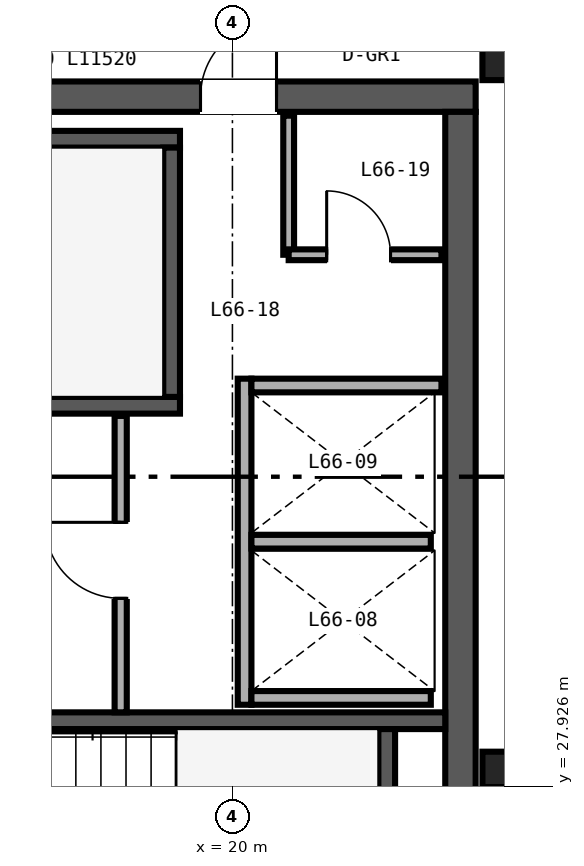
"""IFC4 building model, lengths in metres.
Left out: names, types, materials, properties, quantities, classifications, styles, units other than length and angle.
Written with IfcOpenShell. Run it as: python <this file> out.ifc"""

import sys

from ifc_helpers import new_model, si_unit, direction, frame, frame_2d, origin, origin_2d, place, context, subcontext, project, spatial, rectangle, i_section, extrude, source, transform, mapped, element, fill, save


model = new_model("IFC4")
c1 = context("Model", 3, precision=1e-05, world=origin(), true_north=direction((0.0, 1.0)))
c2 = subcontext(c1, "Body", "Model", "MODEL_VIEW")
j1 = project(units=[si_unit("LENGTHUNIT", "METRE"), si_unit("PLANEANGLEUNIT", "RADIAN")], contexts=[c1])
p1 = place(None, origin())
s1 = spatial("IfcSite", under=j1, at=p1, CompositionType="ELEMENT")
p2 = place(p1, origin())
s2 = spatial("IfcBuilding", under=s1, at=p2, CompositionType="ELEMENT")
p3 = place(p2, frame((0.0, 0.0, 261.6)))
s3 = spatial("IfcBuildingStorey", under=s2, at=p3, CompositionType="ELEMENT", Elevation=261.6)
p4 = place(p3, frame((10.8, 37.0, 0.0), z_axis=(0.0, 0.0, 1.0), x_axis=(1.0, 0.0, 0.0)))
e1 = element("IfcWall", 1, at=p4, inside=s3, PredefinedType="SHEAR", context=c2, shape_type="SweptSolid", body=[
    extrude(rectangle(XDim=12.4, YDim=0.4, at=frame_2d((6.2, 0.0))), origin(), (0.0, 0.0, 1.0), 3.38),
])
p5 = place(p4, frame((8.78, 0.0, 0.0)))
e2 = element("IfcOpeningElement", 2, at=p5, cuts=e1, PredefinedType="OPENING", context=c2, shape_type="SweptSolid", body=[
    extrude(rectangle(XDim=1.0, YDim=2.15, at=frame_2d((0.5, 1.075))), frame((0.0, 0.21, 0.0), z_axis=(0.0, -1.0, 0.0), x_axis=(1.0, 0.0, 0.0)), (0.0, 0.0, 1.0), 0.42),
])
p6 = place(p3, frame((23.0, 15.2, 0.0), z_axis=(0.0, 0.0, 1.0), x_axis=(0.0, 1.0, 0.0)))
e3 = element("IfcWall", 3, at=p6, inside=s3, PredefinedType="SHEAR", context=c2, shape_type="SweptSolid", body=[
    extrude(rectangle(XDim=21.6, YDim=0.4, at=frame_2d((10.8, 0.0))), origin(), (0.0, 0.0, 1.0), 3.38),
])
p7 = place(p3, frame((11.2, 32.94, 0.0), z_axis=(0.0, 0.0, 1.0), x_axis=(1.0, 0.0, 0.0)))
e4 = element("IfcWall", 4, at=p7, inside=s3, PredefinedType="SHEAR", context=c2, shape_type="SweptSolid", body=[
    extrude(rectangle(XDim=8.11, YDim=0.22, at=frame_2d((4.055, 0.0))), origin(), (0.0, 0.0, 1.0), 3.4),
])
p8 = place(p7, frame((0.72, 0.0, 0.0)))
e5 = element("IfcOpeningElement", 5, at=p8, cuts=e4, PredefinedType="OPENING", context=c2, shape_type="SweptSolid", body=[
    extrude(rectangle(XDim=1.05, YDim=2.15, at=frame_2d((0.525, 1.075))), frame((0.0, 0.12, 0.0), z_axis=(0.0, -1.0, 0.0), x_axis=(1.0, 0.0, 0.0)), (0.0, 0.0, 1.0), 0.24),
])
p9 = place(p3, frame((11.2, 36.44, 0.0), z_axis=(0.0, 0.0, 1.0), x_axis=(1.0, 0.0, 0.0)))
e6 = element("IfcWall", 6, at=p9, inside=s3, PredefinedType="SHEAR", context=c2, shape_type="SweptSolid", body=[
    extrude(rectangle(XDim=8.11, YDim=0.22, at=frame_2d((4.055, 0.0))), origin(), (0.0, 0.0, 1.0), 3.4),
])
p10 = place(p3, frame((19.2, 33.05, 0.0), z_axis=(0.0, 0.0, 1.0), x_axis=(0.0, 1.0, 0.0)))
e7 = element("IfcWall", 7, at=p10, inside=s3, PredefinedType="SHEAR", context=c2, shape_type="SweptSolid", body=[
    extrude(rectangle(XDim=3.28, YDim=0.22, at=frame_2d((1.64, 0.0))), origin(), (0.0, 0.0, 1.0), 3.4),
])
p11 = place(p3, frame((14.18, 28.79, 0.0), z_axis=(0.0, 0.0, 1.0), x_axis=(1.0, 0.0, 0.0)))
e8 = element("IfcWall", 8, at=p11, inside=s3, PredefinedType="SHEAR", context=c2, shape_type="SweptSolid", body=[
    extrude(rectangle(XDim=8.62, YDim=0.22, at=frame_2d((4.31, 0.0))), origin(), (0.0, 0.0, 1.0), 3.4),
])
p12 = place(p3, frame((22.03, 25.4, 0.0), z_axis=(0.0, 0.0, 1.0), x_axis=(0.0, 1.0, 0.0)))
e9 = element("IfcWall", 9, at=p12, inside=s3, PredefinedType="SHEAR", context=c2, shape_type="SweptSolid", body=[
    extrude(rectangle(XDim=3.28, YDim=0.22, at=frame_2d((1.64, 0.0))), origin(), (0.0, 0.0, 1.0), 3.4),
])
m1 = source(origin(), c2, "Body", "SweptSolid", [
    extrude(i_section(OverallWidth=0.422, OverallDepth=0.465, WebThickness=0.045, FlangeThickness=0.073, FilletRadius=0.025, at=origin_2d()), origin(), (0.0, 0.0, 1.0), 3.38),
])
for number, where, z_axis, x_axis in (
    (10, (23.5, 28.15, 0.0), (0.0, 0.0, 1.0), (1.0, 0.0, 0.0)),
    (11, (23.5, 37.45, 0.0), (0.0, 0.0, 1.0), (1.0, 0.0, 0.0)),
):
    element("IfcColumn", number, at=place(p3, frame(where, z_axis=z_axis, x_axis=x_axis)), inside=s3, PredefinedType="COLUMN", context=c2, shape_type="MappedRepresentation", body=[
        mapped(m1, transform((0.0, 0.0, 0.0), scale=1.0)),
    ])
p13 = place(p3, frame((20.16, 29.0, 0.0), z_axis=(0.0, 0.0, 1.0), x_axis=(0.0, 1.0, 0.0)))
e12 = element("IfcWall", 12, at=p13, inside=s3, PredefinedType="SOLIDWALL", context=c2, shape_type="SweptSolid", body=[
    extrude(rectangle(XDim=4.29, YDim=0.18, at=frame_2d((2.145, 0.0))), origin(), (0.0, 0.0, 1.0), 3.38),
])
p14 = place(p3, frame((20.25, 29.09, 0.0), z_axis=(0.0, 0.0, 1.0), x_axis=(1.0, 0.0, 0.0)))
e13 = element("IfcWall", 13, at=p14, inside=s3, PredefinedType="SOLIDWALL", context=c2, shape_type="SweptSolid", body=[
    extrude(rectangle(XDim=2.36, YDim=0.18, at=frame_2d((1.18, 0.0))), origin(), (0.0, 0.0, 1.0), 3.38),
])
p15 = place(p3, frame((20.25, 33.2, 0.0), z_axis=(0.0, 0.0, 1.0), x_axis=(1.0, 0.0, 0.0)))
e14 = element("IfcWall", 14, at=p15, inside=s3, PredefinedType="SOLIDWALL", context=c2, shape_type="SweptSolid", body=[
    extrude(rectangle(XDim=2.5, YDim=0.18, at=frame_2d((1.25, 0.0))), origin(), (0.0, 0.0, 1.0), 3.38),
])
p16 = place(p3, frame((20.25, 31.145, 0.0), z_axis=(0.0, 0.0, 1.0), x_axis=(1.0, 0.0, 0.0)))
e15 = element("IfcWall", 15, at=p16, inside=s3, PredefinedType="SOLIDWALL", context=c2, shape_type="SweptSolid", body=[
    extrude(rectangle(XDim=2.36, YDim=0.18, at=frame_2d((1.18, 0.0))), origin(), (0.0, 0.0, 1.0), 3.38),
])
p17 = place(p3, frame((18.53, 28.9, 0.0), z_axis=(0.0, 0.0, 1.0), x_axis=(0.0, 1.0, 0.0)))
e16 = element("IfcWall", 16, at=p17, inside=s3, PredefinedType="PARTITIONING", context=c2, shape_type="SweptSolid", body=[
    extrude(rectangle(XDim=3.9, YDim=0.16, at=frame_2d((1.95, 0.0))), origin(), (0.0, 0.0, 1.0), 3.38),
])
p18 = place(p17, frame((1.5, 0.0, 0.0)))
e17 = element("IfcOpeningElement", 17, at=p18, cuts=e16, PredefinedType="OPENING", context=c2, shape_type="SweptSolid", body=[
    extrude(rectangle(XDim=1.0, YDim=2.15, at=frame_2d((0.5, 1.075))), frame((0.0, 0.09, 0.0), z_axis=(0.0, -1.0, 0.0), x_axis=(1.0, 0.0, 0.0)), (0.0, 0.0, 1.0), 0.18),
])
p19 = place(p3, frame((20.74, 34.92, 0.0), z_axis=(0.0, 0.0, 1.0), x_axis=(0.0, 1.0, 0.0)))
e18 = element("IfcWall", 18, at=p19, inside=s3, PredefinedType="PARTITIONING", context=c2, shape_type="SweptSolid", body=[
    extrude(rectangle(XDim=1.83, YDim=0.142, at=frame_2d((0.915, 0.0))), origin(), (0.0, 0.0, 1.0), 3.38),
])
p20 = place(p3, frame((20.74, 34.92, 0.0), z_axis=(0.0, 0.0, 1.0), x_axis=(1.0, 0.0, 0.0)))
e19 = element("IfcWall", 19, at=p20, inside=s3, PredefinedType="PARTITIONING", context=c2, shape_type="SweptSolid", body=[
    extrude(rectangle(XDim=2.01, YDim=0.142, at=frame_2d((1.005, 0.0))), origin(), (0.0, 0.0, 1.0), 3.38),
])
p21 = place(p20, frame((0.5, 0.0, 0.0)))
e20 = element("IfcOpeningElement", 20, at=p21, cuts=e19, PredefinedType="OPENING", context=c2, shape_type="SweptSolid", body=[
    extrude(rectangle(XDim=0.84, YDim=2.1, at=frame_2d((0.42, 1.05))), frame((0.0, 0.081, 0.0), z_axis=(0.0, -1.0, 0.0), x_axis=(1.0, 0.0, 0.0)), (0.0, 0.0, 1.0), 0.162),
])
m2 = source(origin(), c2, "Body", "SweptSolid", [
    extrude(rectangle(XDim=1.0, YDim=2.15, at=frame_2d((0.5, 1.075))), frame((0.0, 0.025, 0.0), z_axis=(0.0, -1.0, 0.0), x_axis=(1.0, 0.0, 0.0)), (0.0, 0.0, 1.0), 0.05),
])
p22 = place(p18, origin())
e21 = element("IfcDoor", 21, at=p22, inside=s3, OperationType="SINGLE_SWING_RIGHT", PredefinedType="DOOR", context=c2, shape_type="MappedRepresentation", body=[
    mapped(m2, transform((0.0, 0.0, 0.0), scale=1.0)),
])
fill(e17, e21)
m3 = source(origin(), c2, "Body", "SweptSolid", [
    extrude(rectangle(XDim=0.84, YDim=2.1, at=frame_2d((0.42, 1.05))), frame((0.0, 0.025, 0.0), z_axis=(0.0, -1.0, 0.0), x_axis=(1.0, 0.0, 0.0)), (0.0, 0.0, 1.0), 0.05),
])
p23 = place(p21, origin())
e22 = element("IfcDoor", 22, at=p23, inside=s3, OperationType="SINGLE_SWING_LEFT", PredefinedType="DOOR", context=c2, shape_type="MappedRepresentation", body=[
    mapped(m3, transform((0.0, 0.0, 0.0), scale=1.0)),
])
fill(e20, e22)
p24 = place(p5, origin())
e23 = element("IfcDoor", 23, at=p24, inside=s3, OperationType="SINGLE_SWING_RIGHT", PredefinedType="DOOR", context=c2, shape_type="MappedRepresentation", body=[
    mapped(m2, transform((0.0, 0.0, 0.0), scale=1.0)),
])
fill(e2, e23)
save(model, sys.argv[1])
